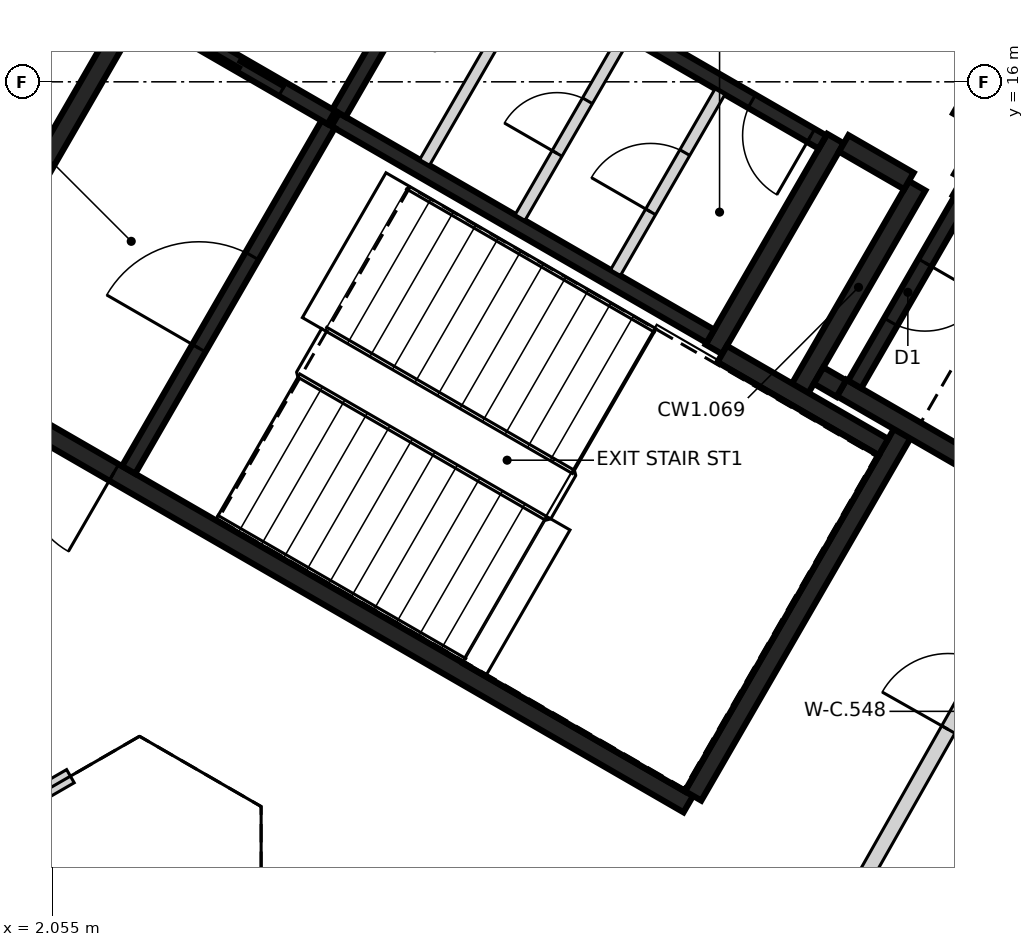
"""IFC4 building model, lengths in metres.
Left out: names, types, materials, properties, quantities, classifications, styles, units other than length and angle.
Written with IfcOpenShell. Run it as: python <this file> out.ifc"""

import sys

from ifc_helpers import new_model, si_unit, direction, frame, frame_2d, origin, place, context, subcontext, project, spatial, rectangle, extrude, element, fill, save


model = new_model("IFC4")
c1 = context("Model", 3, precision=1e-05, world=origin(), true_north=direction((0.0, 1.0)))
c2 = subcontext(c1, "Body", "Model", "MODEL_VIEW")
j1 = project(units=[si_unit("LENGTHUNIT", "METRE"), si_unit("PLANEANGLEUNIT", "RADIAN")], contexts=[c1])
p1 = place(None, origin())
s1 = spatial("IfcSite", under=j1, at=p1, CompositionType="ELEMENT")
p2 = place(p1, origin())
s2 = spatial("IfcBuilding", under=s1, at=p2, CompositionType="ELEMENT")
p3 = place(p2, frame((0.0, 0.0, 139.6)))
s3 = spatial("IfcBuildingStorey", under=s2, at=p3, CompositionType="ELEMENT", Elevation=139.6)
p4 = place(p3, frame((10.42, 6.498, 0.0), z_axis=(0.0, 0.0, 1.0), x_axis=(-0.866021906294, 0.500006057782, 0.0)))
e1 = element("IfcWall", 1, at=p4, inside=s3, PredefinedType="SHEAR", context=c2, shape_type="SweptSolid", body=[
    extrude(rectangle(XDim=11.55, YDim=0.25, at=frame_2d((5.775, 0.0))), origin(), (0.0, 0.0, 1.0), 3.2),
])
p5 = place(p4, frame((10.025, 0.0, 0.0)))
e2 = element("IfcOpeningElement", 2, at=p5, cuts=e1, PredefinedType="OPENING", context=c2, shape_type="SweptSolid", body=[
    extrude(rectangle(XDim=1.2, YDim=2.1, at=frame_2d((0.6, 1.05))), frame((0.0, 0.135, 0.0), z_axis=(0.0, -1.0, 0.0), x_axis=(1.0, 0.0, 0.0)), (0.0, 0.0, 1.0), 0.27),
])
p6 = place(p4, frame((8.725, 0.0, 0.0)))
e3 = element("IfcOpeningElement", 3, at=p6, cuts=e1, PredefinedType="OPENING", context=c2, shape_type="SweptSolid", body=[
    extrude(rectangle(XDim=1.2, YDim=2.1, at=frame_2d((0.6, 1.05))), frame((0.0, 0.135, 0.0), z_axis=(0.0, -1.0, 0.0), x_axis=(1.0, 0.0, 0.0)), (0.0, 0.0, 1.0), 0.27),
])
p7 = place(p3, frame((0.48, 12.381, 0.0), z_axis=(0.0, 0.0, 1.0), x_axis=(0.49999885962, 0.866026062182, 0.0)))
e4 = element("IfcWall", 4, at=p7, inside=s3, PredefinedType="SHEAR", context=c2, shape_type="SweptSolid", body=[
    extrude(rectangle(XDim=5.225, YDim=0.25, at=frame_2d((2.612, 0.0))), origin(), (0.0, 0.0, 1.0), 3.2),
])
p8 = place(p3, frame((13.238, 11.378, 0.0), z_axis=(0.0, 0.0, 1.0), x_axis=(-0.500008851346, -0.866020293397, 0.0)))
e5 = element("IfcWall", 5, at=p8, inside=s3, PredefinedType="SHEAR", context=c2, shape_type="SweptSolid", body=[
    extrude(rectangle(XDim=5.51, YDim=0.25, at=frame_2d((2.755, 0.0))), origin(), (0.0, 0.0, 1.0), 3.2),
])
p9 = place(p3, frame((12.357, 15.252, 0.0), z_axis=(0.0, 0.0, 1.0), x_axis=(-0.500028443584, -0.866008981251, 0.0)))
e6 = element("IfcWall", 6, at=p9, inside=s3, PredefinedType="SHEAR", context=c2, shape_type="SweptSolid", body=[
    extrude(rectangle(XDim=3.2, YDim=0.25, at=frame_2d((1.6, 0.0))), origin(), (0.0, 0.0, 1.0), 3.2),
])
p10 = place(p3, frame((14.918, 10.54, 0.0), z_axis=(0.0, 0.0, 1.0), x_axis=(-0.866063538972, 0.499933942099, 0.0)))
e7 = element("IfcWall", 7, at=p10, inside=s3, PredefinedType="SHEAR", context=c2, shape_type="SweptSolid", body=[
    extrude(rectangle(XDim=2.865, YDim=0.25, at=frame_2d((1.432, 0.0))), origin(), (0.0, 0.0, 1.0), 3.2),
])
p11 = place(p3, frame((13.963, 14.614, 0.0), z_axis=(0.0, 0.0, 1.0), x_axis=(0.866042235819, -0.499970844928, 0.0)))
e8 = element("IfcWall", 8, at=p11, inside=s3, PredefinedType="SHEAR", context=c2, shape_type="SweptSolid", body=[
    extrude(rectangle(XDim=2.865, YDim=0.25, at=frame_2d((1.432, 0.0))), origin(), (0.0, 0.0, 1.0), 3.2),
])
p12 = place(p3, frame((11.888, 11.961, 0.0), z_axis=(0.0, 0.0, 1.0), x_axis=(0.500003324108, 0.866023484601, 0.0)))
e9 = element("IfcWall", 9, at=p12, inside=s3, PredefinedType="SHEAR", context=c2, shape_type="SweptSolid", body=[
    extrude(rectangle(XDim=3.085, YDim=0.25, at=frame_2d((1.542, 0.0))), origin(), (0.0, 0.0, 1.0), 3.2),
])
p13 = place(p3, frame((10.865, 12.418, 0.0), z_axis=(0.0, 0.0, 1.0), x_axis=(0.866026229868, -0.499998569178, 0.0)))
e10 = element("IfcWall", 10, at=p13, inside=s3, PredefinedType="SHEAR", context=c2, shape_type="SweptSolid", body=[
    extrude(rectangle(XDim=2.449, YDim=0.25, at=frame_2d((1.225, 0.0))), origin(), (0.0, 0.0, 1.0), 3.2),
])
p14 = place(p3, frame((14.945, 17.135, 0.0), z_axis=(0.0, 0.0, 1.0), x_axis=(-0.499983108224, -0.866035156036, 0.0)))
e11 = element("IfcWall", 11, at=p14, inside=s3, PredefinedType="SHEAR", context=c2, shape_type="SweptSolid", body=[
    extrude(rectangle(XDim=1.865, YDim=0.25, at=frame_2d((0.932, 0.0))), origin(), (0.0, 0.0, 1.0), 3.2),
])
p15 = place(p14, frame((0.535, 0.0, 0.0)))
e12 = element("IfcOpeningElement", 12, at=p15, cuts=e11, PredefinedType="OPENING", context=c2, shape_type="SweptSolid", body=[
    extrude(rectangle(XDim=1.25, YDim=2.1, at=frame_2d((0.625, 1.05))), frame((0.0, 0.135, 0.0), z_axis=(0.0, -1.0, 0.0), x_axis=(1.0, 0.0, 0.0)), (0.0, 0.0, 1.0), 0.27),
])
p16 = place(p3, frame((13.322, 14.695, 0.0), z_axis=(0.0, 0.0, 1.0), x_axis=(-0.866017078145, 0.500014420154, 0.0)))
e13 = element("IfcWall", 13, at=p16, inside=s3, PredefinedType="SHEAR", context=c2, shape_type="SweptSolid", body=[
    extrude(rectangle(XDim=0.989, YDim=0.25, at=frame_2d((0.495, 0.0))), origin(), (0.0, 0.0, 1.0), 3.2),
])
p17 = place(p3, frame((14.368, 15.315, 0.0), z_axis=(0.0, 0.0, 1.0), x_axis=(-0.499897359611, -0.866084655132, 0.0)))
e14 = element("IfcWall", 14, at=p17, inside=s3, PredefinedType="SHEAR", context=c2, shape_type="SweptSolid", body=[
    extrude(rectangle(XDim=0.685, YDim=0.25, at=frame_2d((0.342, 0.0))), origin(), (0.0, 0.0, 1.0), 3.2),
])
p18 = place(p3, frame((12.433, 11.964, 0.0), z_axis=(0.0, 0.0, 1.0), x_axis=(-0.866055875208, 0.499947218231, 0.0)))
e15 = element("IfcWall", 15, at=p18, inside=s3, PredefinedType="SHEAR", context=c2, shape_type="SweptSolid", body=[
    extrude(rectangle(XDim=0.345, YDim=0.25, at=frame_2d((0.172, 0.0))), origin(), (0.0, 0.0, 1.0), 3.2),
])
p19 = place(p3, frame((5.775, 15.502, 0.0), z_axis=(0.0, 0.0, 1.0), x_axis=(0.866020080793, -0.500009219579, 0.0)))
e16 = element("IfcWall", 16, at=p19, inside=s3, PredefinedType="SHEAR", context=c2, shape_type="SweptSolid", body=[
    extrude(rectangle(XDim=5.699, YDim=0.2, at=frame_2d((2.85, 0.0))), origin(), (0.0, 0.0, 1.0), 3.2),
])
p20 = place(p3, frame((12.185, 15.207, 0.0), z_axis=(0.0, 0.0, 1.0), x_axis=(-0.866020080793, 0.500009219579, 0.0)))
e17 = element("IfcWall", 17, at=p20, inside=s3, PredefinedType="SHEAR", context=c2, shape_type="SweptSolid", body=[
    extrude(rectangle(XDim=5.699, YDim=0.2, at=frame_2d((2.85, 0.0))), origin(), (0.0, 0.0, 1.0), 3.2),
])
p21 = place(p20, frame((0.174, 0.0, 0.0)))
e18 = element("IfcOpeningElement", 18, at=p21, cuts=e17, PredefinedType="OPENING", context=c2, shape_type="SweptSolid", body=[
    extrude(rectangle(XDim=0.9, YDim=2.1, at=frame_2d((0.45, 1.05))), frame((0.0, 0.11, 0.0), z_axis=(0.0, -1.0, 0.0), x_axis=(1.0, 0.0, 0.0)), (0.0, 0.0, 1.0), 0.22),
])
p22 = place(p20, frame((4.599, 0.0, 0.0)))
e19 = element("IfcOpeningElement", 19, at=p22, cuts=e17, PredefinedType="OPENING", context=c2, shape_type="SweptSolid", body=[
    extrude(rectangle(XDim=0.9, YDim=2.1, at=frame_2d((0.45, 1.05))), frame((0.0, 0.11, 0.0), z_axis=(0.0, -1.0, 0.0), x_axis=(1.0, 0.0, 0.0)), (0.0, 0.0, 1.0), 0.22),
])
p23 = place(p3, frame((3.057, 10.895, 0.0), z_axis=(0.0, 0.0, 1.0), x_axis=(0.499989418164, 0.866031513124, 0.0)))
e20 = element("IfcWall", 20, at=p23, inside=s3, PredefinedType="SHEAR", context=c2, shape_type="SweptSolid", body=[
    extrude(rectangle(XDim=5.251, YDim=0.2, at=frame_2d((2.625, 0.0))), origin(), (0.0, 0.0, 1.0), 3.2),
])
p24 = place(p23, frame((1.849, 0.0, 0.0)))
e21 = element("IfcOpeningElement", 21, at=p24, cuts=e20, PredefinedType="OPENING", context=c2, shape_type="SweptSolid", body=[
    extrude(rectangle(XDim=1.4, YDim=2.1, at=frame_2d((0.7, 1.05))), frame((0.0, 0.11, 0.0), z_axis=(0.0, -1.0, 0.0), x_axis=(1.0, 0.0, 0.0)), (0.0, 0.0, 1.0), 0.22),
])
p25 = place(p3, frame((14.008, 14.442, 0.0), z_axis=(0.0, 0.0, 1.0), x_axis=(-0.499986818241, -0.866033014143, 0.0)))
e22 = element("IfcWall", 22, at=p25, inside=s3, PredefinedType="SHEAR", context=c2, shape_type="SweptSolid", body=[
    extrude(rectangle(XDim=2.798, YDim=0.2, at=frame_2d((1.399, 0.0))), origin(), (0.0, 0.0, 1.0), 3.2),
])
p26 = place(p25, frame((0.949, 0.0, 0.0)))
e23 = element("IfcOpeningElement", 23, at=p26, cuts=e22, PredefinedType="OPENING", context=c2, shape_type="SweptSolid", body=[
    extrude(rectangle(XDim=0.9, YDim=2.1, at=frame_2d((0.45, 1.05))), frame((0.0, 0.11, 0.0), z_axis=(0.0, -1.0, 0.0), x_axis=(1.0, 0.0, 0.0)), (0.0, 0.0, 1.0), 0.22),
])
p27 = place(p3, frame((7.199, 17.97, 0.0), z_axis=(0.0, 0.0, 1.0), x_axis=(-0.499968400327, -0.866043647095, 0.0)))
e24 = element("IfcWall", 24, at=p27, inside=s3, PredefinedType="SHEAR", context=c2, shape_type="SweptSolid", body=[
    extrude(rectangle(XDim=2.75, YDim=0.2, at=frame_2d((1.375, 0.0))), origin(), (0.0, 0.0, 1.0), 3.2),
])
p28 = place(p3, frame((5.725, 15.531, 0.0), z_axis=(0.0, 0.0, 1.0), x_axis=(-0.866037306777, 0.499979382845, 0.0)))
e25 = element("IfcWall", 25, at=p28, inside=s3, PredefinedType="SHEAR", context=c2, shape_type="SweptSolid", body=[
    extrude(rectangle(XDim=2.742, YDim=0.2, at=frame_2d((1.371, 0.0))), origin(), (0.0, 0.0, 1.0), 3.2),
])
p29 = place(p28, frame((0.743, 0.0, 0.0)))
e26 = element("IfcOpeningElement", 26, at=p29, cuts=e25, PredefinedType="OPENING", context=c2, shape_type="SweptSolid", body=[
    extrude(rectangle(XDim=1.3, YDim=2.1, at=frame_2d((0.65, 1.05))), frame((0.0, 0.11, 0.0), z_axis=(0.0, -1.0, 0.0), x_axis=(1.0, 0.0, 0.0)), (0.0, 0.0, 1.0), 0.22),
])
p30 = place(p3, frame((9.462, 13.489, 0.0), z_axis=(0.0, 0.0, 1.0), x_axis=(0.50002746344, 0.86600954718, 0.0)))
e27 = element("IfcWall", 27, at=p30, inside=s3, PredefinedType="PARTITIONING", context=c2, shape_type="SweptSolid", body=[
    extrude(rectangle(XDim=2.748, YDim=0.15, at=frame_2d((1.374, 0.0))), origin(), (0.0, 0.0, 1.0), 3.2),
])
p31 = place(p30, frame((0.924, 0.0, 0.0)))
e28 = element("IfcOpeningElement", 28, at=p31, cuts=e27, PredefinedType="OPENING", context=c2, shape_type="SweptSolid", body=[
    extrude(rectangle(XDim=0.9, YDim=2.1, at=frame_2d((0.45, 1.05))), frame((0.0, 0.085, 0.0), z_axis=(0.0, -1.0, 0.0), x_axis=(1.0, 0.0, 0.0)), (0.0, 0.0, 1.0), 0.17),
])
p32 = place(p3, frame((8.207, 14.214, 0.0), z_axis=(0.0, 0.0, 1.0), x_axis=(0.499922376475, 0.866070215109, 0.0)))
e29 = element("IfcWall", 29, at=p32, inside=s3, PredefinedType="PARTITIONING", context=c2, shape_type="SweptSolid", body=[
    extrude(rectangle(XDim=2.749, YDim=0.15, at=frame_2d((1.374, 0.0))), origin(), (0.0, 0.0, 1.0), 3.2),
])
p33 = place(p32, frame((0.974, 0.0, 0.0)))
e30 = element("IfcOpeningElement", 30, at=p33, cuts=e29, PredefinedType="OPENING", context=c2, shape_type="SweptSolid", body=[
    extrude(rectangle(XDim=0.8, YDim=2.1, at=frame_2d((0.4, 1.05))), frame((0.0, 0.085, 0.0), z_axis=(0.0, -1.0, 0.0), x_axis=(1.0, 0.0, 0.0)), (0.0, 0.0, 1.0), 0.17),
])
p34 = place(p3, frame((6.951, 14.939, 0.0), z_axis=(0.0, 0.0, 1.0), x_axis=(0.50002746344, 0.86600954718, 0.0)))
e31 = element("IfcWall", 31, at=p34, inside=s3, PredefinedType="PARTITIONING", context=c2, shape_type="SweptSolid", body=[
    extrude(rectangle(XDim=2.748, YDim=0.15, at=frame_2d((1.374, 0.0))), origin(), (0.0, 0.0, 1.0), 3.2),
])
p35 = place(p3, frame((12.433, 4.992, 0.0), z_axis=(0.0, 0.0, 1.0), x_axis=(0.492740203499, 0.870176471675, 0.0)))
e32 = element("IfcWall", 32, at=p35, inside=s3, PredefinedType="PARTITIONING", context=c2, shape_type="SweptSolid", body=[
    extrude(rectangle(XDim=6.265, YDim=0.2, at=frame_2d((3.133, 0.0))), origin(), (0.0, 0.0, 1.0), 3.2),
])
p36 = place(p35, frame((2.858, 0.0, 0.0)))
e33 = element("IfcOpeningElement", 33, at=p36, cuts=e32, PredefinedType="OPENING", context=c2, shape_type="SweptSolid", body=[
    extrude(rectangle(XDim=1.0, YDim=2.1, at=frame_2d((0.5, 1.05))), frame((0.0, 0.11, 0.0), z_axis=(0.0, -1.0, 0.0), x_axis=(1.0, 0.0, 0.0)), (0.0, 0.0, 1.0), 0.22),
])
p37 = place(p3, frame((-7.082, 1.453, 0.0), z_axis=(0.0, 0.0, 1.0), x_axis=(0.866010525116, 0.500025769724, 0.0)))
e34 = element("IfcWall", 34, at=p37, inside=s3, PredefinedType="PARTITIONING", context=c2, shape_type="SweptSolid", body=[
    extrude(rectangle(XDim=10.823, YDim=0.2, at=frame_2d((5.411, 0.0))), origin(), (0.0, 0.0, 1.0), 2.3),
])
p38 = place(p29, origin())
e35 = element("IfcDoor", 35, at=p38, inside=s3, OperationType="SLIDING_TO_RIGHT", PredefinedType="DOOR", context=c2, shape_type="SweptSolid", body=[
    extrude(rectangle(XDim=1.3, YDim=2.1, at=frame_2d((0.65, 1.05))), frame((0.0, 0.025, 0.0), z_axis=(0.0, -1.0, 0.0), x_axis=(1.0, 0.0, 0.0)), (0.0, 0.0, 1.0), 0.05),
])
fill(e26, e35)
p39 = place(p6, origin())
e36 = element("IfcDoor", 36, at=p39, inside=s3, OperationType="SINGLE_SWING_RIGHT", PredefinedType="DOOR", context=c2, shape_type="SweptSolid", body=[
    extrude(rectangle(XDim=1.2, YDim=2.1, at=frame_2d((0.6, 1.05))), frame((0.0, 0.025, 0.0), z_axis=(0.0, -1.0, 0.0), x_axis=(1.0, 0.0, 0.0)), (0.0, 0.0, 1.0), 0.05),
])
fill(e3, e36)
p40 = place(p24, origin())
e37 = element("IfcDoor", 37, at=p40, inside=s3, OperationType="SINGLE_SWING_RIGHT", PredefinedType="DOOR", context=c2, shape_type="SweptSolid", body=[
    extrude(rectangle(XDim=1.4, YDim=2.1, at=frame_2d((0.7, 1.05))), frame((0.0, 0.025, 0.0), z_axis=(0.0, -1.0, 0.0), x_axis=(1.0, 0.0, 0.0)), (0.0, 0.0, 1.0), 0.05),
])
fill(e21, e37)
p41 = place(p21, origin())
e38 = element("IfcDoor", 38, at=p41, inside=s3, OperationType="SINGLE_SWING_LEFT", PredefinedType="DOOR", context=c2, shape_type="SweptSolid", body=[
    extrude(rectangle(XDim=0.9, YDim=2.1, at=frame_2d((0.45, 1.05))), frame((0.0, 0.025, 0.0), z_axis=(0.0, -1.0, 0.0), x_axis=(1.0, 0.0, 0.0)), (0.0, 0.0, 1.0), 0.05),
])
fill(e18, e38)
p42 = place(p31, origin())
e39 = element("IfcDoor", 39, at=p42, inside=s3, OperationType="SINGLE_SWING_RIGHT", PredefinedType="DOOR", context=c2, shape_type="SweptSolid", body=[
    extrude(rectangle(XDim=0.9, YDim=2.1, at=frame_2d((0.45, 1.05))), frame((0.0, 0.025, 0.0), z_axis=(0.0, -1.0, 0.0), x_axis=(1.0, 0.0, 0.0)), (0.0, 0.0, 1.0), 0.05),
])
fill(e28, e39)
p43 = place(p33, origin())
e40 = element("IfcDoor", 40, at=p43, inside=s3, OperationType="SINGLE_SWING_LEFT", PredefinedType="DOOR", context=c2, shape_type="SweptSolid", body=[
    extrude(rectangle(XDim=0.8, YDim=2.1, at=frame_2d((0.4, 1.05))), frame((0.0, 0.025, 0.0), z_axis=(0.0, -1.0, 0.0), x_axis=(1.0, 0.0, 0.0)), (0.0, 0.0, 1.0), 0.05),
])
fill(e30, e40)
p44 = place(p26, origin())
e41 = element("IfcDoor", 41, at=p44, inside=s3, OperationType="SINGLE_SWING_LEFT", PredefinedType="DOOR", context=c2, shape_type="SweptSolid", body=[
    extrude(rectangle(XDim=0.9, YDim=2.1, at=frame_2d((0.45, 1.05))), frame((0.0, 0.025, 0.0), z_axis=(0.0, -1.0, 0.0), x_axis=(1.0, 0.0, 0.0)), (0.0, 0.0, 1.0), 0.05),
])
fill(e23, e41)
p45 = place(p36, frame((1.0, 0.0, 0.0), z_axis=(0.0, 0.0, 1.0), x_axis=(-1.0, 0.0, 0.0)))
e42 = element("IfcDoor", 42, at=p45, inside=s3, OperationType="SINGLE_SWING_LEFT", PredefinedType="DOOR", context=c2, shape_type="SweptSolid", body=[
    extrude(rectangle(XDim=1.0, YDim=2.1, at=frame_2d((0.5, 1.05))), frame((0.0, 0.025, 0.0), z_axis=(0.0, -1.0, 0.0), x_axis=(1.0, 0.0, 0.0)), (0.0, 0.0, 1.0), 0.05),
])
fill(e33, e42)
save(model, sys.argv[1])
